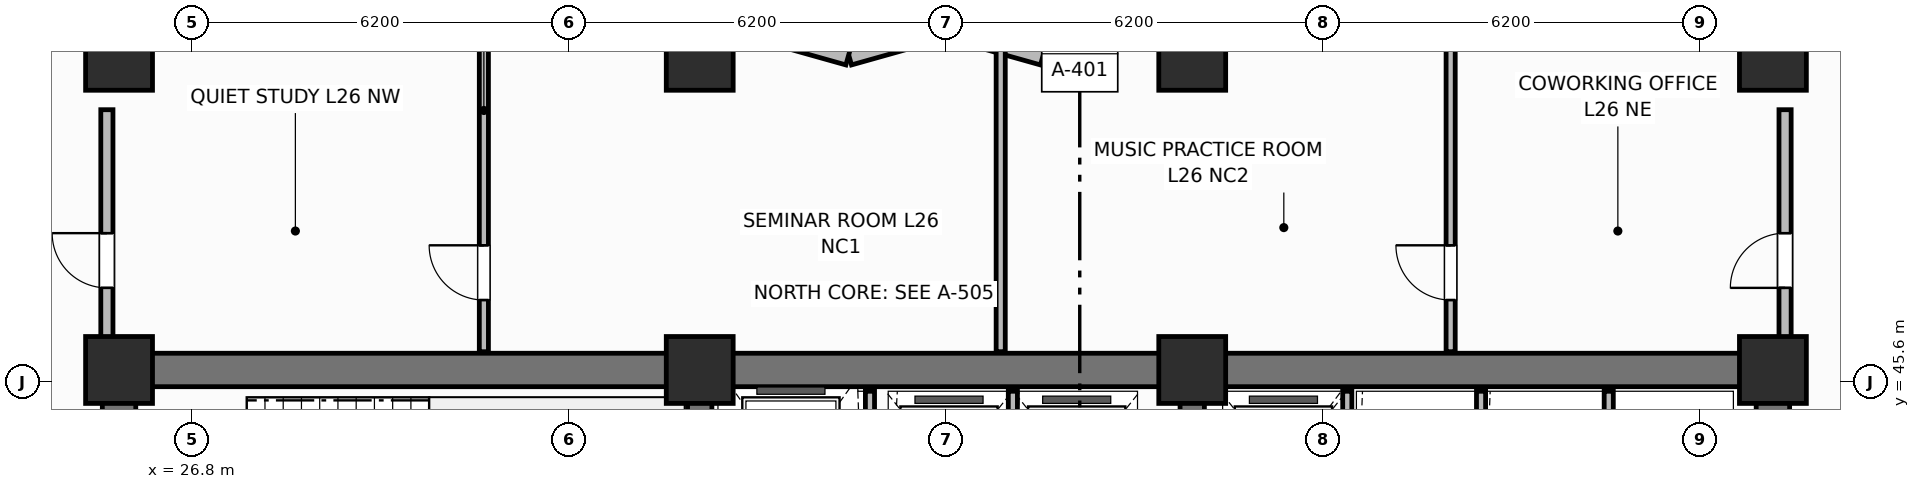
"""IFC4 building model, lengths in metres.
Left out: names, types, materials, properties, quantities, classifications, styles, units other than length and angle.
Written with IfcOpenShell. Run it as: python <this file> out.ifc"""

import sys

from ifc_helpers import new_model, si_unit, direction, frame, frame_2d, origin, origin_2d, place, context, subcontext, project, spatial, rectangle, extrude, element, fill, save


model = new_model("IFC4")
c1 = context("Model", 3, precision=1e-05, world=origin(), true_north=direction((0.0, 1.0)))
c2 = subcontext(c1, "Body", "Model", "MODEL_VIEW")
j1 = project(units=[si_unit("LENGTHUNIT", "METRE"), si_unit("PLANEANGLEUNIT", "RADIAN")], contexts=[c1])
p1 = place(None, origin())
s1 = spatial("IfcSite", under=j1, at=p1, CompositionType="ELEMENT")
p2 = place(p1, origin())
s2 = spatial("IfcBuilding", under=s1, at=p2, CompositionType="ELEMENT")
p3 = place(p2, frame((0.0, 0.0, 106.8)))
s3 = spatial("IfcBuildingStorey", under=s2, at=p3, CompositionType="ELEMENT", Elevation=106.8)
p4 = place(p3, frame((25.6, 45.8, 0.0), z_axis=(0.0, 0.0, 1.0), x_axis=(1.0, 0.0, 0.0)))
e1 = element("IfcWall", 1, at=p4, inside=s3, PredefinedType="SHEAR", context=c2, shape_type="SweptSolid", body=[
    extrude(rectangle(XDim=27.2, YDim=0.55, at=frame_2d((13.6, 0.0))), origin(), (0.0, 0.0, 1.0), 3.7),
])
for number, where, z_axis, x_axis in (
    (2, (25.6, 39.875, 0.0), (0.0, 0.0, 1.0), (0.0, 1.0, 0.0)),
    (3, (52.8, 39.875, 0.0), (0.0, 0.0, 1.0), (0.0, 1.0, 0.0)),
):
    element("IfcWall", number, at=place(p3, frame(where, z_axis=z_axis, x_axis=x_axis)), inside=s3, PredefinedType="SHEAR", context=c2, shape_type="SweptSolid", body=[
        extrude(rectangle(XDim=5.65, YDim=0.55, at=frame_2d((2.825, 0.0))), origin(), (0.0, 0.0, 1.0), 3.7),
    ])
for number, where, z_axis, x_axis in (
    (4, (35.15, 39.875, 0.0), (0.0, 0.0, 1.0), (0.0, 1.0, 0.0)),
    (5, (43.25, 39.875, 0.0), (0.0, 0.0, 1.0), (0.0, 1.0, 0.0)),
):
    element("IfcWall", number, at=place(p3, frame(where, z_axis=z_axis, x_axis=x_axis)), inside=s3, PredefinedType="SHEAR", context=c2, shape_type="SweptSolid", body=[
        extrude(rectangle(XDim=5.65, YDim=0.4, at=frame_2d((2.825, 0.0))), origin(), (0.0, 0.0, 1.0), 3.7),
    ])
for number, where, z_axis, x_axis in (
    (6, (25.6, 45.8, 0.0), (0.0, 0.0, 1.0), (1.0, 0.0, 0.0)),
    (7, (35.15, 45.8, 0.0), (0.0, 0.0, 1.0), (1.0, 0.0, 0.0)),
    (8, (43.25, 45.8, 0.0), (0.0, 0.0, 1.0), (1.0, 0.0, 0.0)),
    (9, (52.8, 45.8, 0.0), (0.0, 0.0, 1.0), (1.0, 0.0, 0.0)),
    (10, (25.6, 50.95, 0.0), (0.0, 0.0, 1.0), (1.0, 0.0, 0.0)),
    (11, (35.15, 50.95, 0.0), (0.0, 0.0, 1.0), (1.0, 0.0, 0.0)),
    (12, (43.25, 50.95, 0.0), (0.0, 0.0, 1.0), (1.0, 0.0, 0.0)),
    (13, (52.8, 50.95, 0.0), (0.0, 0.0, 1.0), (1.0, 0.0, 0.0)),
):
    element("IfcColumn", number, at=place(p3, frame(where, z_axis=z_axis, x_axis=x_axis)), inside=s3, PredefinedType="COLUMN", context=c2, shape_type="SweptSolid", body=[
        extrude(rectangle(XDim=1.1, YDim=1.1, at=origin_2d()), origin(), (0.0, 0.0, 1.0), 3.7),
    ])
p5 = place(p3, frame((42.4, 51.43, 0.0), z_axis=(0.0, 0.0, 1.0), x_axis=(-0.962652136636, -0.270741322725, 0.0)))
e14 = element("IfcWall", 14, at=p5, inside=s3, PredefinedType="SOLIDWALL", context=c2, shape_type="SweptSolid", body=[
    extrude(rectangle(XDim=1.662, YDim=0.34, at=frame_2d((0.831, 0.0))), origin(), (0.0, 0.0, 1.0), 2.7),
])
p6 = place(p3, frame((40.8, 50.98, 0.0), z_axis=(0.0, 0.0, 1.0), x_axis=(-0.962662902433, 0.270703040766, 0.0)))
e15 = element("IfcWall", 15, at=p6, inside=s3, PredefinedType="SOLIDWALL", context=c2, shape_type="SweptSolid", body=[
    extrude(rectangle(XDim=1.662, YDim=0.34, at=frame_2d((0.831, 0.0))), origin(), (0.0, 0.0, 1.0), 2.7),
])
p7 = place(p3, frame((39.2, 51.43, 0.0), z_axis=(0.0, 0.0, 1.0), x_axis=(-0.962652136636, -0.270741322725, 0.0)))
e16 = element("IfcWall", 16, at=p7, inside=s3, PredefinedType="SOLIDWALL", context=c2, shape_type="SweptSolid", body=[
    extrude(rectangle(XDim=1.662, YDim=0.34, at=frame_2d((0.831, 0.0))), origin(), (0.0, 0.0, 1.0), 2.7),
])
p8 = place(p3, frame((37.6, 50.98, 0.0), z_axis=(0.0, 0.0, 1.0), x_axis=(-0.962662902433, 0.270703040766, 0.0)))
e17 = element("IfcWall", 17, at=p8, inside=s3, PredefinedType="SOLIDWALL", context=c2, shape_type="SweptSolid", body=[
    extrude(rectangle(XDim=1.662, YDim=0.34, at=frame_2d((0.831, 0.0))), origin(), (0.0, 0.0, 1.0), 2.7),
])
p9 = place(p3, frame((37.95, 42.6, 0.0), z_axis=(0.0, 0.0, 1.0), x_axis=(0.0, 1.0, 0.0)))
e18 = element("IfcWall", 18, at=p9, inside=s3, PredefinedType="PARTITIONING", context=c2, shape_type="SweptSolid", body=[
    extrude(rectangle(XDim=2.85, YDim=0.15, at=frame_2d((1.425, 0.0))), origin(), (0.0, 0.0, 1.0), 2.53),
])
for number, where, z_axis, x_axis in (
    (19, (40.3, 42.65, 0.0), (0.0, 0.0, 1.0), (0.0, 1.0, 0.0)),
    (20, (45.8, 42.65, 0.0), (0.0, 0.0, 1.0), (0.0, 1.0, 0.0)),
    (21, (48.0, 42.65, 0.0), (0.0, 0.0, 1.0), (0.0, 1.0, 0.0)),
    (22, (50.1, 42.65, 0.0), (0.0, 0.0, 1.0), (0.0, 1.0, 0.0)),
):
    element("IfcWall", number, at=place(p3, frame(where, z_axis=z_axis, x_axis=x_axis)), inside=s3, PredefinedType="PARTITIONING", context=c2, shape_type="SweptSolid", body=[
        extrude(rectangle(XDim=2.8, YDim=0.15, at=frame_2d((1.4, 0.0))), origin(), (0.0, 0.0, 1.0), 2.53),
    ])
p10 = place(p3, frame((31.6, 46.1, 0.0), z_axis=(0.0, 0.0, 1.0), x_axis=(0.0, 1.0, 0.0)))
e23 = element("IfcWall", 23, at=p10, inside=s3, PredefinedType="PARTITIONING", context=c2, shape_type="SweptSolid", body=[
    extrude(rectangle(XDim=5.33, YDim=0.15, at=frame_2d((2.665, 0.0))), origin(), (0.0, 0.0, 1.0), 2.53),
])
p11 = place(p10, frame((0.85, 0.0, 0.0)))
e24 = element("IfcOpeningElement", 24, at=p11, cuts=e23, PredefinedType="OPENING", context=c2, shape_type="SweptSolid", body=[
    extrude(rectangle(XDim=0.9, YDim=2.1, at=frame_2d((0.45, 1.05))), frame((0.0, 0.085, 0.0), z_axis=(0.0, -1.0, 0.0), x_axis=(1.0, 0.0, 0.0)), (0.0, 0.0, 1.0), 0.17),
])
p12 = place(p3, frame((40.1, 46.1, 0.0), z_axis=(0.0, 0.0, 1.0), x_axis=(0.0, 1.0, 0.0)))
e25 = element("IfcWall", 25, at=p12, inside=s3, PredefinedType="PARTITIONING", context=c2, shape_type="SweptSolid", body=[
    extrude(rectangle(XDim=5.33, YDim=0.15, at=frame_2d((2.665, 0.0))), origin(), (0.0, 0.0, 1.0), 2.53),
])
p13 = place(p3, frame((47.5, 46.1, 0.0), z_axis=(0.0, 0.0, 1.0), x_axis=(0.0, 1.0, 0.0)))
e26 = element("IfcWall", 26, at=p13, inside=s3, PredefinedType="PARTITIONING", context=c2, shape_type="SweptSolid", body=[
    extrude(rectangle(XDim=5.33, YDim=0.15, at=frame_2d((2.665, 0.0))), origin(), (0.0, 0.0, 1.0), 2.53),
])
p14 = place(p13, frame((0.85, 0.0, 0.0)))
e27 = element("IfcOpeningElement", 27, at=p14, cuts=e26, PredefinedType="OPENING", context=c2, shape_type="SweptSolid", body=[
    extrude(rectangle(XDim=0.9, YDim=2.1, at=frame_2d((0.45, 1.05))), frame((0.0, 0.085, 0.0), z_axis=(0.0, -1.0, 0.0), x_axis=(1.0, 0.0, 0.0)), (0.0, 0.0, 1.0), 0.17),
])
p15 = place(p3, frame((25.4, 46.1, 0.0), z_axis=(0.0, 0.0, 1.0), x_axis=(0.0, 1.0, 0.0)))
e28 = element("IfcWall", 28, at=p15, inside=s3, PredefinedType="PARTITIONING", context=c2, shape_type="SweptSolid", body=[
    extrude(rectangle(XDim=3.98, YDim=0.2, at=frame_2d((1.99, 0.0))), origin(), (0.0, 0.0, 1.0), 2.53),
])
p16 = place(p15, frame((1.05, 0.0, 0.0)))
e29 = element("IfcOpeningElement", 29, at=p16, cuts=e28, PredefinedType="OPENING", context=c2, shape_type="SweptSolid", body=[
    extrude(rectangle(XDim=0.9, YDim=2.1, at=frame_2d((0.45, 1.05))), frame((0.0, 0.11, 0.0), z_axis=(0.0, -1.0, 0.0), x_axis=(1.0, 0.0, 0.0)), (0.0, 0.0, 1.0), 0.22),
])
p17 = place(p3, frame((53.0, 46.1, 0.0), z_axis=(0.0, 0.0, 1.0), x_axis=(0.0, 1.0, 0.0)))
e30 = element("IfcWall", 30, at=p17, inside=s3, PredefinedType="PARTITIONING", context=c2, shape_type="SweptSolid", body=[
    extrude(rectangle(XDim=3.98, YDim=0.2, at=frame_2d((1.99, 0.0))), origin(), (0.0, 0.0, 1.0), 2.53),
])
p18 = place(p17, frame((1.05, 0.0, 0.0)))
e31 = element("IfcOpeningElement", 31, at=p18, cuts=e30, PredefinedType="OPENING", context=c2, shape_type="SweptSolid", body=[
    extrude(rectangle(XDim=0.9, YDim=2.1, at=frame_2d((0.45, 1.05))), frame((0.0, 0.11, 0.0), z_axis=(0.0, -1.0, 0.0), x_axis=(1.0, 0.0, 0.0)), (0.0, 0.0, 1.0), 0.22),
])
p19 = place(p11, origin())
e32 = element("IfcDoor", 32, at=p19, inside=s3, OperationType="SINGLE_SWING_RIGHT", PredefinedType="DOOR", context=c2, shape_type="SweptSolid", body=[
    extrude(rectangle(XDim=0.9, YDim=2.1, at=frame_2d((0.45, 1.05))), frame((0.0, 0.025, 0.0), z_axis=(0.0, -1.0, 0.0), x_axis=(1.0, 0.0, 0.0)), (0.0, 0.0, 1.0), 0.05),
])
fill(e24, e32)
p20 = place(p14, origin())
e33 = element("IfcDoor", 33, at=p20, inside=s3, OperationType="SINGLE_SWING_RIGHT", PredefinedType="DOOR", context=c2, shape_type="SweptSolid", body=[
    extrude(rectangle(XDim=0.9, YDim=2.1, at=frame_2d((0.45, 1.05))), frame((0.0, 0.025, 0.0), z_axis=(0.0, -1.0, 0.0), x_axis=(1.0, 0.0, 0.0)), (0.0, 0.0, 1.0), 0.05),
])
fill(e27, e33)
p21 = place(p16, origin())
e34 = element("IfcDoor", 34, at=p21, inside=s3, OperationType="SINGLE_SWING_RIGHT", PredefinedType="DOOR", context=c2, shape_type="SweptSolid", body=[
    extrude(rectangle(XDim=0.9, YDim=2.1, at=frame_2d((0.45, 1.05))), frame((0.0, 0.025, 0.0), z_axis=(0.0, -1.0, 0.0), x_axis=(1.0, 0.0, 0.0)), (0.0, 0.0, 1.0), 0.05),
])
fill(e29, e34)
p22 = place(p18, origin())
e35 = element("IfcDoor", 35, at=p22, inside=s3, OperationType="SINGLE_SWING_LEFT", PredefinedType="DOOR", context=c2, shape_type="SweptSolid", body=[
    extrude(rectangle(XDim=0.9, YDim=2.1, at=frame_2d((0.45, 1.05))), frame((0.0, 0.025, 0.0), z_axis=(0.0, -1.0, 0.0), x_axis=(1.0, 0.0, 0.0)), (0.0, 0.0, 1.0), 0.05),
])
fill(e31, e35)
save(model, sys.argv[1])
